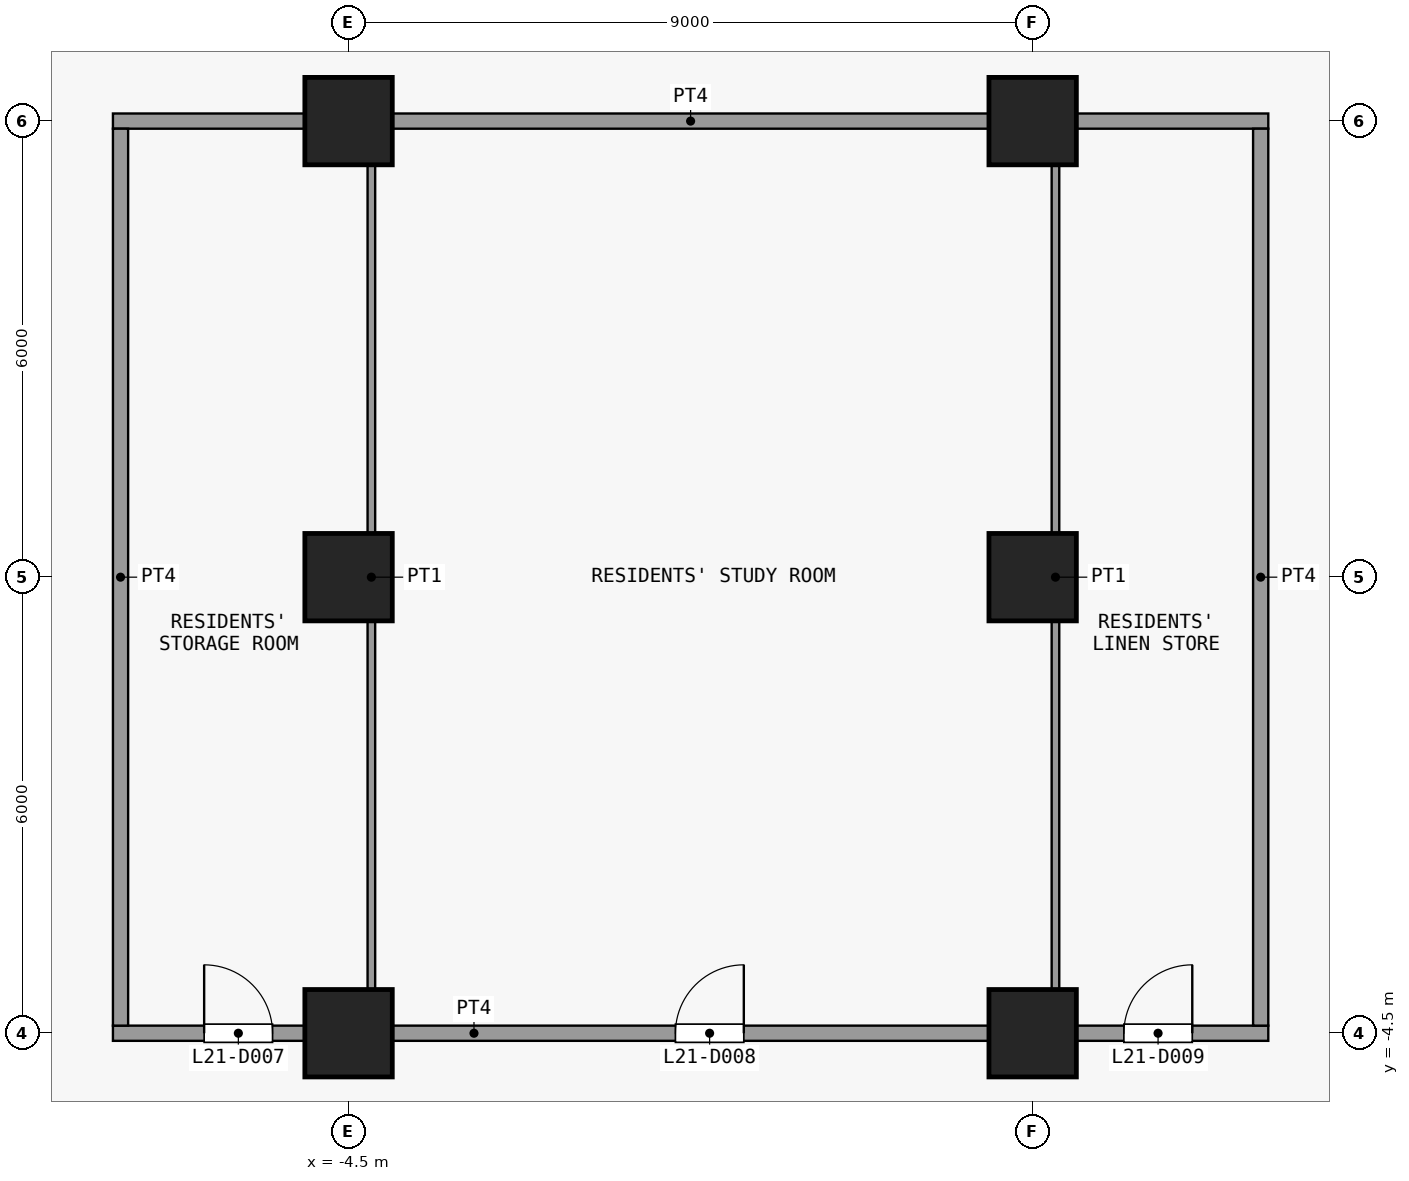
"""IFC4 building model, lengths in metres.
Left out: names, types, materials, properties, quantities, classifications, styles, units other than length and angle.
Written with IfcOpenShell. Run it as: python <this file> out.ifc"""

import sys

from ifc_helpers import new_model, si_unit, direction, frame, frame_2d, origin, origin_2d, place, context, subcontext, project, spatial, rectangle, extrude, element, fill, save


model = new_model("IFC4")
c1 = context("Model", 3, precision=1e-05, world=origin(), true_north=direction((0.0, 1.0)))
c2 = subcontext(c1, "Body", "Model", "MODEL_VIEW")
j1 = project(units=[si_unit("LENGTHUNIT", "METRE"), si_unit("PLANEANGLEUNIT", "RADIAN")], contexts=[c1])
p1 = place(None, origin())
s1 = spatial("IfcSite", under=j1, at=p1, CompositionType="ELEMENT")
p2 = place(p1, origin())
s2 = spatial("IfcBuilding", under=s1, at=p2, CompositionType="ELEMENT")
p3 = place(p2, frame((0.0, 0.0, 88.3)))
s3 = spatial("IfcBuildingStorey", under=s2, at=p3, CompositionType="ELEMENT", Elevation=88.3)
for number, where, z_axis, x_axis in (
    (1, (-4.5, -4.5, 0.0), (0.0, 0.0, 1.0), (1.0, 0.0, 0.0)),
    (2, (-4.5, 1.5, 0.0), (0.0, 0.0, 1.0), (1.0, 0.0, 0.0)),
    (3, (-4.5, 7.5, 0.0), (0.0, 0.0, 1.0), (1.0, 0.0, 0.0)),
    (4, (4.5, -4.5, 0.0), (0.0, 0.0, 1.0), (1.0, 0.0, 0.0)),
    (5, (4.5, 1.5, 0.0), (0.0, 0.0, 1.0), (1.0, 0.0, 0.0)),
    (6, (4.5, 7.5, 0.0), (0.0, 0.0, 1.0), (1.0, 0.0, 0.0)),
):
    element("IfcColumn", number, at=place(p3, frame(where, z_axis=z_axis, x_axis=x_axis)), inside=s3, PredefinedType="COLUMN", context=c2, shape_type="SweptSolid", body=[
        extrude(rectangle(XDim=1.15, YDim=1.15, at=origin_2d()), origin(), (0.0, 0.0, 1.0), 3.6),
    ])
p4 = place(p3, frame((-7.6, -4.5, 0.0), z_axis=(0.0, 0.0, 1.0), x_axis=(1.0, 0.0, 0.0)))
e7 = element("IfcWall", 7, at=p4, inside=s3, PredefinedType="PARTITIONING", context=c2, shape_type="SweptSolid", body=[
    extrude(rectangle(XDim=15.2, YDim=0.2, at=frame_2d((7.6, 0.0))), origin(), (0.0, 0.0, 1.0), 3.3),
])
p5 = place(p4, frame((1.2, 0.0, 0.0)))
e8 = element("IfcOpeningElement", 8, at=p5, cuts=e7, PredefinedType="OPENING", context=c2, shape_type="SweptSolid", body=[
    extrude(rectangle(XDim=0.9, YDim=2.1, at=frame_2d((0.45, 1.05))), frame((0.0, 0.11, 0.0), z_axis=(0.0, -1.0, 0.0), x_axis=(1.0, 0.0, 0.0)), (0.0, 0.0, 1.0), 0.22),
])
p6 = place(p4, frame((7.4, 0.0, 0.0)))
e9 = element("IfcOpeningElement", 9, at=p6, cuts=e7, PredefinedType="OPENING", context=c2, shape_type="SweptSolid", body=[
    extrude(rectangle(XDim=0.9, YDim=2.1, at=frame_2d((0.45, 1.05))), frame((0.0, 0.11, 0.0), z_axis=(0.0, -1.0, 0.0), x_axis=(1.0, 0.0, 0.0)), (0.0, 0.0, 1.0), 0.22),
])
p7 = place(p4, frame((13.3, 0.0, 0.0)))
e10 = element("IfcOpeningElement", 10, at=p7, cuts=e7, PredefinedType="OPENING", context=c2, shape_type="SweptSolid", body=[
    extrude(rectangle(XDim=0.9, YDim=2.1, at=frame_2d((0.45, 1.05))), frame((0.0, 0.11, 0.0), z_axis=(0.0, -1.0, 0.0), x_axis=(1.0, 0.0, 0.0)), (0.0, 0.0, 1.0), 0.22),
])
p8 = place(p3, frame((-7.6, 7.5, 0.0), z_axis=(0.0, 0.0, 1.0), x_axis=(1.0, 0.0, 0.0)))
e11 = element("IfcWall", 11, at=p8, inside=s3, PredefinedType="PARTITIONING", context=c2, shape_type="SweptSolid", body=[
    extrude(rectangle(XDim=15.2, YDim=0.2, at=frame_2d((7.6, 0.0))), origin(), (0.0, 0.0, 1.0), 3.3),
])
p9 = place(p3, frame((-7.5, -4.4, 0.0), z_axis=(0.0, 0.0, 1.0), x_axis=(0.0, 1.0, 0.0)))
e12 = element("IfcWall", 12, at=p9, inside=s3, PredefinedType="PARTITIONING", context=c2, shape_type="SweptSolid", body=[
    extrude(rectangle(XDim=11.8, YDim=0.2, at=frame_2d((5.9, 0.0))), origin(), (0.0, 0.0, 1.0), 3.3),
])
for number, where, z_axis, x_axis in (
    (13, (-4.2, -4.4, 0.0), (0.0, 0.0, 1.0), (0.0, 1.0, 0.0)),
    (14, (4.8, -4.4, 0.0), (0.0, 0.0, 1.0), (0.0, 1.0, 0.0)),
):
    element("IfcWall", number, at=place(p3, frame(where, z_axis=z_axis, x_axis=x_axis)), inside=s3, PredefinedType="PARTITIONING", context=c2, shape_type="SweptSolid", body=[
        extrude(rectangle(XDim=11.8, YDim=0.1, at=frame_2d((5.9, 0.0))), origin(), (0.0, 0.0, 1.0), 3.3),
    ])
p10 = place(p3, frame((7.5, -4.4, 0.0), z_axis=(0.0, 0.0, 1.0), x_axis=(0.0, 1.0, 0.0)))
e15 = element("IfcWall", 15, at=p10, inside=s3, PredefinedType="PARTITIONING", context=c2, shape_type="SweptSolid", body=[
    extrude(rectangle(XDim=11.8, YDim=0.2, at=frame_2d((5.9, 0.0))), origin(), (0.0, 0.0, 1.0), 3.3),
])
p11 = place(p5, origin())
e16 = element("IfcDoor", 16, at=p11, inside=s3, OperationType="SINGLE_SWING_RIGHT", PredefinedType="DOOR", context=c2, shape_type="SweptSolid", body=[
    extrude(rectangle(XDim=0.9, YDim=2.1, at=frame_2d((0.45, 1.05))), frame((0.0, 0.025, 0.0), z_axis=(0.0, -1.0, 0.0), x_axis=(1.0, 0.0, 0.0)), (0.0, 0.0, 1.0), 0.05),
])
fill(e8, e16)
p12 = place(p6, origin())
e17 = element("IfcDoor", 17, at=p12, inside=s3, OperationType="SINGLE_SWING_LEFT", PredefinedType="DOOR", context=c2, shape_type="SweptSolid", body=[
    extrude(rectangle(XDim=0.9, YDim=2.1, at=frame_2d((0.45, 1.05))), frame((0.0, 0.025, 0.0), z_axis=(0.0, -1.0, 0.0), x_axis=(1.0, 0.0, 0.0)), (0.0, 0.0, 1.0), 0.05),
])
fill(e9, e17)
p13 = place(p7, origin())
e18 = element("IfcDoor", 18, at=p13, inside=s3, OperationType="SINGLE_SWING_LEFT", PredefinedType="DOOR", context=c2, shape_type="SweptSolid", body=[
    extrude(rectangle(XDim=0.9, YDim=2.1, at=frame_2d((0.45, 1.05))), frame((0.0, 0.025, 0.0), z_axis=(0.0, -1.0, 0.0), x_axis=(1.0, 0.0, 0.0)), (0.0, 0.0, 1.0), 0.05),
])
fill(e10, e18)
save(model, sys.argv[1])
